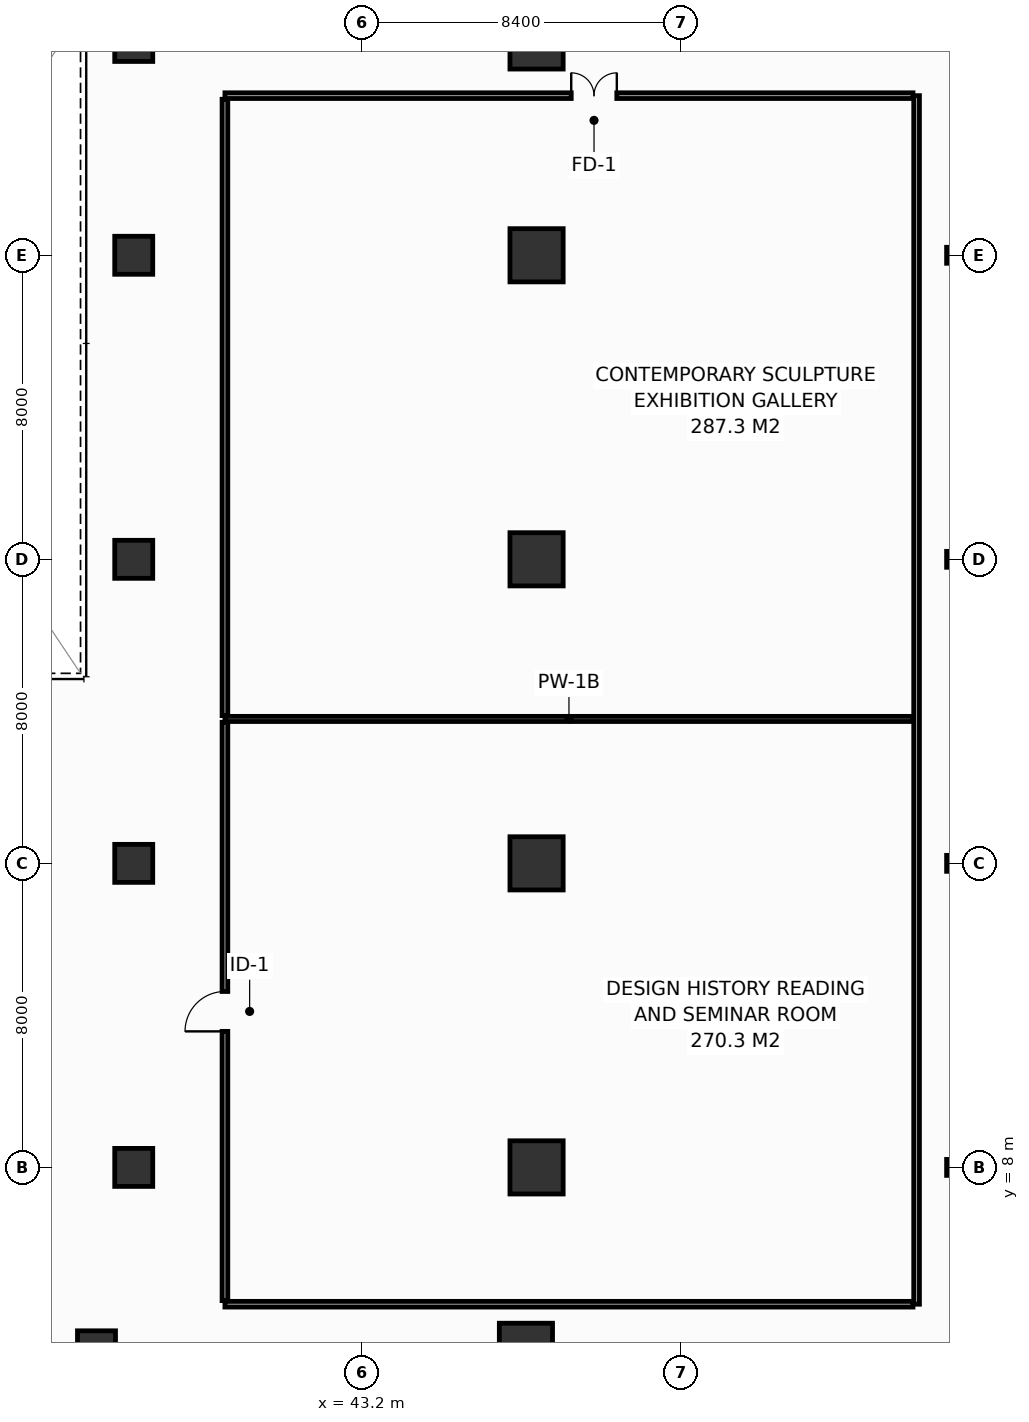
"""IFC4 building model, lengths in metres.
Left out: names, types, materials, properties, quantities, classifications, styles, units other than length and angle.
Written with IfcOpenShell. Run it as: python <this file> out.ifc"""

import sys

from ifc_helpers import new_model, si_unit, direction, frame, frame_2d, origin, origin_2d, place, context, subcontext, project, spatial, rectangle, hollow_rectangle, i_section, extrude, element, fill, save


model = new_model("IFC4")
c1 = context("Model", 3, precision=1e-05, world=origin(), true_north=direction((0.0, 1.0)))
c2 = subcontext(c1, "Body", "Model", "MODEL_VIEW")
j1 = project(units=[si_unit("LENGTHUNIT", "METRE"), si_unit("PLANEANGLEUNIT", "RADIAN")], contexts=[c1])
p1 = place(None, origin())
s1 = spatial("IfcSite", under=j1, at=p1, CompositionType="ELEMENT")
p2 = place(p1, origin())
s2 = spatial("IfcBuilding", under=s1, at=p2, CompositionType="ELEMENT")
p3 = place(p2, frame((0.0, 0.0, 6.0)))
s3 = spatial("IfcBuildingStorey", under=s2, at=p3, CompositionType="ELEMENT", Elevation=6.0)
p4 = place(p3, frame((36.22, 3.2, 0.0), z_axis=(0.0, 0.0, 1.0), x_axis=(1.0, 0.0, 0.0)))
e1 = element("IfcColumn", 1, at=p4, inside=s3, PredefinedType="COLUMN", context=c2, shape_type="SweptSolid", body=[
    extrude(hollow_rectangle(XDim=1.0, YDim=1.0, WallThickness=0.045, at=origin_2d()), origin(), (0.0, 0.0, 1.0), 5.4),
])
p5 = place(p3, frame((47.52, 3.2, 0.0), z_axis=(0.0, 0.0, 1.0), x_axis=(1.0, 0.0, 0.0)))
e2 = element("IfcColumn", 2, at=p5, inside=s3, PredefinedType="COLUMN", context=c2, shape_type="SweptSolid", body=[
    extrude(hollow_rectangle(XDim=1.4, YDim=1.4, WallThickness=0.065, at=origin_2d()), origin(), (0.0, 0.0, 1.0), 5.4),
])
p6 = place(p3, frame((37.2, 8.0, 0.0), z_axis=(0.0, 0.0, 1.0), x_axis=(1.0, 0.0, 0.0)))
e3 = element("IfcColumn", 3, at=p6, inside=s3, PredefinedType="COLUMN", context=c2, shape_type="SweptSolid", body=[
    extrude(hollow_rectangle(XDim=1.0, YDim=1.0, WallThickness=0.045, at=origin_2d()), origin(), (0.0, 0.0, 1.0), 5.4),
])
p7 = place(p3, frame((47.8, 8.0, 0.0), z_axis=(0.0, 0.0, 1.0), x_axis=(1.0, 0.0, 0.0)))
e4 = element("IfcColumn", 4, at=p7, inside=s3, PredefinedType="COLUMN", context=c2, shape_type="SweptSolid", body=[
    extrude(hollow_rectangle(XDim=1.4, YDim=1.4, WallThickness=0.065, at=origin_2d()), origin(), (0.0, 0.0, 1.0), 5.4),
])
p8 = place(p3, frame((37.2, 16.0, 0.0), z_axis=(0.0, 0.0, 1.0), x_axis=(1.0, 0.0, 0.0)))
e5 = element("IfcColumn", 5, at=p8, inside=s3, PredefinedType="COLUMN", context=c2, shape_type="SweptSolid", body=[
    extrude(hollow_rectangle(XDim=1.0, YDim=1.0, WallThickness=0.045, at=origin_2d()), origin(), (0.0, 0.0, 1.0), 5.4),
])
p9 = place(p3, frame((47.8, 16.0, 0.0), z_axis=(0.0, 0.0, 1.0), x_axis=(1.0, 0.0, 0.0)))
e6 = element("IfcColumn", 6, at=p9, inside=s3, PredefinedType="COLUMN", context=c2, shape_type="SweptSolid", body=[
    extrude(hollow_rectangle(XDim=1.4, YDim=1.4, WallThickness=0.065, at=origin_2d()), origin(), (0.0, 0.0, 1.0), 5.4),
])
p10 = place(p3, frame((37.2, 24.0, 0.0), z_axis=(0.0, 0.0, 1.0), x_axis=(1.0, 0.0, 0.0)))
e7 = element("IfcColumn", 7, at=p10, inside=s3, PredefinedType="COLUMN", context=c2, shape_type="SweptSolid", body=[
    extrude(hollow_rectangle(XDim=1.0, YDim=1.0, WallThickness=0.045, at=origin_2d()), origin(), (0.0, 0.0, 1.0), 5.4),
])
p11 = place(p3, frame((47.8, 24.0, 0.0), z_axis=(0.0, 0.0, 1.0), x_axis=(1.0, 0.0, 0.0)))
e8 = element("IfcColumn", 8, at=p11, inside=s3, PredefinedType="COLUMN", context=c2, shape_type="SweptSolid", body=[
    extrude(hollow_rectangle(XDim=1.4, YDim=1.4, WallThickness=0.065, at=origin_2d()), origin(), (0.0, 0.0, 1.0), 5.4),
])
p12 = place(p3, frame((37.2, 32.0, 0.0), z_axis=(0.0, 0.0, 1.0), x_axis=(1.0, 0.0, 0.0)))
e9 = element("IfcColumn", 9, at=p12, inside=s3, PredefinedType="COLUMN", context=c2, shape_type="SweptSolid", body=[
    extrude(hollow_rectangle(XDim=1.0, YDim=1.0, WallThickness=0.045, at=origin_2d()), origin(), (0.0, 0.0, 1.0), 5.4),
])
p13 = place(p3, frame((47.8, 32.0, 0.0), z_axis=(0.0, 0.0, 1.0), x_axis=(1.0, 0.0, 0.0)))
e10 = element("IfcColumn", 10, at=p13, inside=s3, PredefinedType="COLUMN", context=c2, shape_type="SweptSolid", body=[
    extrude(hollow_rectangle(XDim=1.4, YDim=1.4, WallThickness=0.065, at=origin_2d()), origin(), (0.0, 0.0, 1.0), 5.4),
])
p14 = place(p3, frame((37.2, 37.6, 0.0), z_axis=(0.0, 0.0, 1.0), x_axis=(1.0, 0.0, 0.0)))
e11 = element("IfcColumn", 11, at=p14, inside=s3, PredefinedType="COLUMN", context=c2, shape_type="SweptSolid", body=[
    extrude(hollow_rectangle(XDim=1.0, YDim=1.0, WallThickness=0.045, at=origin_2d()), origin(), (0.0, 0.0, 1.0), 5.4),
])
p15 = place(p3, frame((47.8, 37.6, 0.0), z_axis=(0.0, 0.0, 1.0), x_axis=(1.0, 0.0, 0.0)))
e12 = element("IfcColumn", 12, at=p15, inside=s3, PredefinedType="COLUMN", context=c2, shape_type="SweptSolid", body=[
    extrude(hollow_rectangle(XDim=1.4, YDim=1.4, WallThickness=0.065, at=origin_2d()), origin(), (0.0, 0.0, 1.0), 5.4),
])
for number, where, z_axis, x_axis in (
    (13, (58.8, 8.0, 0.0), (0.0, 0.0, 1.0), (1.0, 0.0, 0.0)),
    (14, (58.8, 16.0, 0.0), (0.0, 0.0, 1.0), (1.0, 0.0, 0.0)),
    (15, (58.8, 24.0, 0.0), (0.0, 0.0, 1.0), (1.0, 0.0, 0.0)),
    (16, (58.8, 32.0, 0.0), (0.0, 0.0, 1.0), (1.0, 0.0, 0.0)),
):
    element("IfcColumn", number, at=place(p3, frame(where, z_axis=z_axis, x_axis=x_axis)), inside=s3, PredefinedType="COLUMN", context=c2, shape_type="SweptSolid", body=[
        extrude(i_section(OverallWidth=0.42, OverallDepth=0.42, WebThickness=0.02, FlangeThickness=0.035, FilletRadius=0.022, at=origin_2d()), origin(), (0.0, 0.0, 1.0), 5.4),
    ])
p16 = place(p3, frame((57.8, 4.4, 0.0), z_axis=(0.0, 0.0, 1.0), x_axis=(0.0, 1.0, 0.0)))
e17 = element("IfcWall", 17, at=p16, inside=s3, PredefinedType="PARTITIONING", context=c2, shape_type="SweptSolid", body=[
    extrude(rectangle(XDim=31.8, YDim=0.15, at=frame_2d((15.9, 0.0))), origin(), (0.0, 0.0, 1.0), 4.185),
])
p17 = place(p3, frame((39.6, 4.4, 0.0), z_axis=(0.0, 0.0, 1.0), x_axis=(1.0, 0.0, 0.0)))
e18 = element("IfcWall", 18, at=p17, inside=s3, PredefinedType="PARTITIONING", context=c2, shape_type="SweptSolid", body=[
    extrude(rectangle(XDim=18.105, YDim=0.15, at=frame_2d((9.052, 0.0))), origin(), (0.0, 0.0, 1.0), 4.185),
])
p18 = place(p3, frame((39.6, 19.8, 0.0), z_axis=(0.0, 0.0, 1.0), x_axis=(1.0, 0.0, 0.0)))
e19 = element("IfcWall", 19, at=p18, inside=s3, PredefinedType="PARTITIONING", context=c2, shape_type="SweptSolid", body=[
    extrude(rectangle(XDim=18.105, YDim=0.135, at=frame_2d((9.052, 0.0))), origin(), (0.0, 0.0, 1.0), 4.185),
])
p19 = place(p3, frame((39.6, 36.2, 0.0), z_axis=(0.0, 0.0, 1.0), x_axis=(1.0, 0.0, 0.0)))
e20 = element("IfcWall", 20, at=p19, inside=s3, PredefinedType="PARTITIONING", context=c2, shape_type="SweptSolid", body=[
    extrude(rectangle(XDim=18.105, YDim=0.15, at=frame_2d((9.052, 0.0))), origin(), (0.0, 0.0, 1.0), 4.185),
])
p20 = place(p19, frame((9.112, 0.0, 0.0)))
e21 = element("IfcOpeningElement", 21, at=p20, cuts=e20, PredefinedType="OPENING", context=c2, shape_type="SweptSolid", body=[
    extrude(rectangle(XDim=1.2, YDim=2.15, at=frame_2d((0.6, 1.075))), frame((0.0, 0.085, 0.0), z_axis=(0.0, -1.0, 0.0), x_axis=(1.0, 0.0, 0.0)), (0.0, 0.0, 1.0), 0.17),
])
p21 = place(p3, frame((39.6, 4.495, 0.0), z_axis=(0.0, 0.0, 1.0), x_axis=(0.0, 1.0, 0.0)))
e22 = element("IfcWall", 22, at=p21, inside=s3, PredefinedType="PARTITIONING", context=c2, shape_type="SweptSolid", body=[
    extrude(rectangle(XDim=15.217, YDim=0.15, at=frame_2d((7.609, 0.0))), origin(), (0.0, 0.0, 1.0), 4.185),
])
p22 = place(p21, frame((7.084, 0.0, 0.0)))
e23 = element("IfcOpeningElement", 23, at=p22, cuts=e22, PredefinedType="OPENING", context=c2, shape_type="SweptSolid", body=[
    extrude(rectangle(XDim=1.05, YDim=2.15, at=frame_2d((0.525, 1.075))), frame((0.0, 0.085, 0.0), z_axis=(0.0, -1.0, 0.0), x_axis=(1.0, 0.0, 0.0)), (0.0, 0.0, 1.0), 0.17),
])
p23 = place(p3, frame((39.6, 19.887, 0.0), z_axis=(0.0, 0.0, 1.0), x_axis=(0.0, 1.0, 0.0)))
e24 = element("IfcWall", 24, at=p23, inside=s3, PredefinedType="PARTITIONING", context=c2, shape_type="SweptSolid", body=[
    extrude(rectangle(XDim=16.218, YDim=0.15, at=frame_2d((8.109, 0.0))), origin(), (0.0, 0.0, 1.0), 4.185),
])
p24 = place(p20, origin())
e25 = element("IfcDoor", 25, at=p24, inside=s3, OperationType="DOUBLE_DOOR_SINGLE_SWING", PredefinedType="DOOR", context=c2, shape_type="SweptSolid", body=[
    extrude(rectangle(XDim=1.2, YDim=2.15, at=frame_2d((0.6, 1.075))), frame((0.0, 0.025, 0.0), z_axis=(0.0, -1.0, 0.0), x_axis=(1.0, 0.0, 0.0)), (0.0, 0.0, 1.0), 0.05),
])
fill(e21, e25)
p25 = place(p22, origin())
e26 = element("IfcDoor", 26, at=p25, inside=s3, OperationType="SINGLE_SWING_LEFT", PredefinedType="DOOR", context=c2, shape_type="SweptSolid", body=[
    extrude(rectangle(XDim=1.05, YDim=2.15, at=frame_2d((0.525, 1.075))), frame((0.0, 0.025, 0.0), z_axis=(0.0, -1.0, 0.0), x_axis=(1.0, 0.0, 0.0)), (0.0, 0.0, 1.0), 0.05),
])
fill(e23, e26)
save(model, sys.argv[1])
